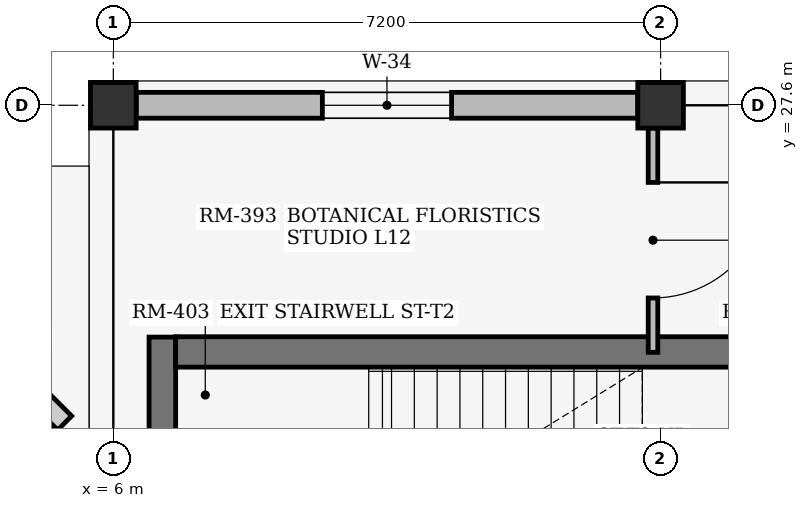
"""IFC4 building model, lengths in metres.
Left out: names, types, materials, properties, quantities, classifications, styles, units other than length and angle.
Written with IfcOpenShell. Run it as: python <this file> out.ifc"""

import sys

from ifc_helpers import new_model, si_unit, direction, frame, frame_2d, origin, origin_2d, place, context, subcontext, project, spatial, rectangle, extrude, element, fill, save


model = new_model("IFC4")
c1 = context("Model", 3, precision=1e-05, world=origin(), true_north=direction((0.0, 1.0)))
c2 = subcontext(c1, "Body", "Model", "MODEL_VIEW")
j1 = project(units=[si_unit("LENGTHUNIT", "METRE"), si_unit("PLANEANGLEUNIT", "RADIAN")], contexts=[c1])
p1 = place(None, origin())
s1 = spatial("IfcSite", under=j1, at=p1, CompositionType="ELEMENT")
p2 = place(p1, origin())
s2 = spatial("IfcBuilding", under=s1, at=p2, CompositionType="ELEMENT")
p3 = place(p2, frame((0.0, 0.0, 48.3)))
s3 = spatial("IfcBuildingStorey", under=s2, at=p3, CompositionType="ELEMENT", Elevation=48.3)
for number, where, z_axis, x_axis in (
    (1, (6.0, 27.6, 0.0), (0.0, 0.0, 1.0), (1.0, 0.0, 0.0)),
    (2, (13.2, 27.6, 0.0), (0.0, 0.0, 1.0), (1.0, 0.0, 0.0)),
):
    element("IfcColumn", number, at=place(p3, frame(where, z_axis=z_axis, x_axis=x_axis)), inside=s3, PredefinedType="COLUMN", context=c2, shape_type="SweptSolid", body=[
        extrude(rectangle(XDim=0.6, YDim=0.6, at=origin_2d()), origin(), (0.0, 0.0, 1.0), 3.68),
    ])
p4 = place(p3, frame((6.3, 27.6, 0.0), z_axis=(0.0, 0.0, 1.0), x_axis=(1.0, 0.0, 0.0)))
e3 = element("IfcWall", 3, at=p4, inside=s3, PredefinedType="STANDARD", context=c2, shape_type="SweptSolid", body=[
    extrude(rectangle(XDim=6.6, YDim=0.34, at=frame_2d((3.3, 0.0))), origin(), (0.0, 0.0, 1.0), 3.26),
])
p5 = place(p4, frame((2.45, 0.0, 0.75)))
e4 = element("IfcOpeningElement", 4, at=p5, cuts=e3, PredefinedType="OPENING", context=c2, shape_type="SweptSolid", body=[
    extrude(rectangle(XDim=1.7, YDim=1.35, at=frame_2d((0.85, 0.675))), frame((0.0, 0.18, 0.0), z_axis=(0.0, -1.0, 0.0), x_axis=(1.0, 0.0, 0.0)), (0.0, 0.0, 1.0), 0.36),
])
p6 = place(p3, frame((6.645, 24.55, 0.0), z_axis=(0.0, 0.0, 1.0), x_axis=(0.0, -1.0, 0.0)))
e5 = element("IfcWall", 5, at=p6, inside=s3, PredefinedType="SHEAR", context=c2, shape_type="SweptSolid", body=[
    extrude(rectangle(XDim=4.59, YDim=0.35, at=frame_2d((2.295, 0.0))), origin(), (0.0, 0.0, 1.0), 3.68),
])
p7 = place(p3, frame((14.8, 24.355, 0.0), z_axis=(0.0, 0.0, 1.0), x_axis=(-1.0, 0.0, 0.0)))
e6 = element("IfcWall", 6, at=p7, inside=s3, PredefinedType="SHEAR", context=c2, shape_type="SweptSolid", body=[
    extrude(rectangle(XDim=7.98, YDim=0.4, at=frame_2d((3.99, 0.0))), origin(), (0.0, 0.0, 1.0), 3.68),
])
p8 = place(p3, frame((13.1, 24.35, 0.0), z_axis=(0.0, 0.0, 1.0), x_axis=(0.0, 1.0, 0.0)))
e7 = element("IfcWall", 7, at=p8, inside=s3, PredefinedType="PARTITIONING", context=c2, shape_type="SweptSolid", body=[
    extrude(rectangle(XDim=2.95, YDim=0.126, at=frame_2d((1.475, 0.0))), origin(), (0.0, 0.0, 1.0), 3.27),
])
p9 = place(p8, frame((0.715, 0.0, 0.0)))
e8 = element("IfcOpeningElement", 8, at=p9, cuts=e7, PredefinedType="OPENING", context=c2, shape_type="SweptSolid", body=[
    extrude(rectangle(XDim=1.52, YDim=2.26, at=frame_2d((0.76, 1.13))), frame((0.0, 0.073, 0.0), z_axis=(0.0, -1.0, 0.0), x_axis=(1.0, 0.0, 0.0)), (0.0, 0.0, 1.0), 0.146),
])
p10 = place(p5, origin())
e9 = element("IfcWindow", 9, at=p10, inside=s3, PartitioningType="SINGLE_PANEL", PredefinedType="WINDOW", context=c2, shape_type="SweptSolid", body=[
    extrude(rectangle(XDim=1.7, YDim=1.35, at=frame_2d((0.85, 0.675))), frame((0.0, 0.03, 0.0), z_axis=(0.0, -1.0, 0.0), x_axis=(1.0, 0.0, 0.0)), (0.0, 0.0, 1.0), 0.06),
])
fill(e4, e9)
p11 = place(p9, origin())
e10 = element("IfcDoor", 10, at=p11, inside=s3, OperationType="SINGLE_SWING_RIGHT", PredefinedType="DOOR", context=c2, shape_type="SweptSolid", body=[
    extrude(rectangle(XDim=1.52, YDim=2.26, at=frame_2d((0.76, 1.13))), frame((0.0, 0.025, 0.0), z_axis=(0.0, -1.0, 0.0), x_axis=(1.0, 0.0, 0.0)), (0.0, 0.0, 1.0), 0.05),
])
fill(e8, e10)
save(model, sys.argv[1])
